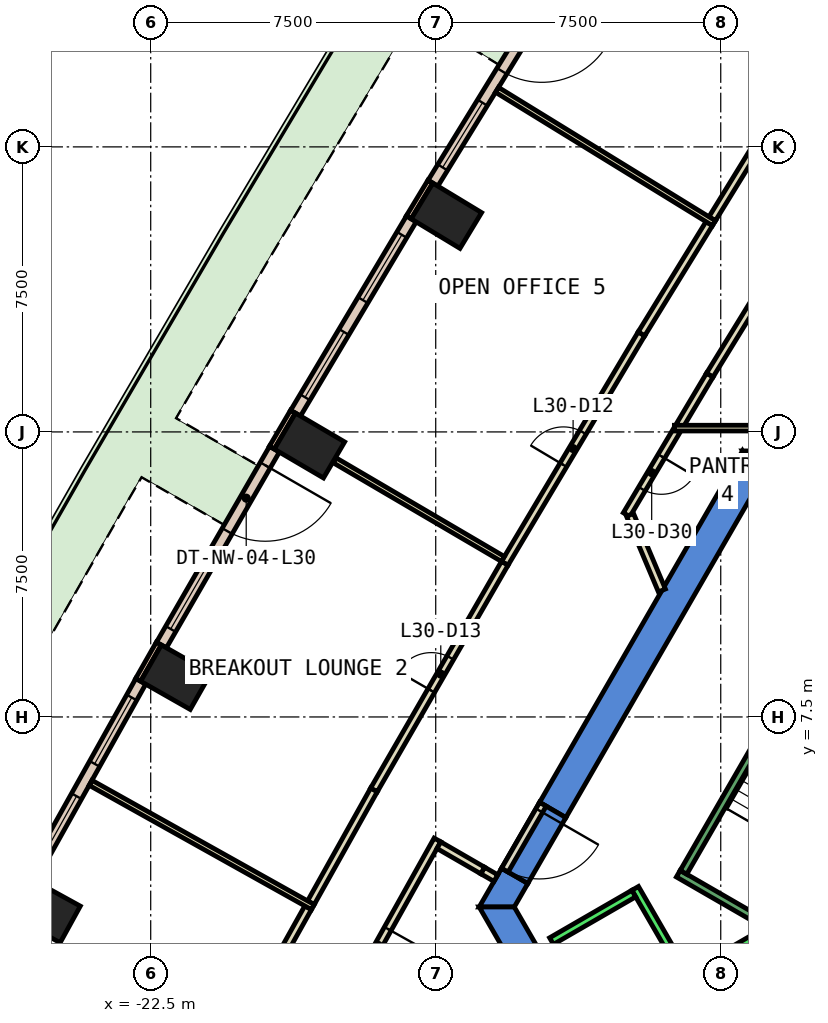
"""IFC4 building model, lengths in metres.
Left out: names, types, materials, properties, quantities, classifications, styles, units other than length and angle.
Written with IfcOpenShell. Run it as: python <this file> out.ifc"""

import sys

from ifc_helpers import new_model, si_unit, direction, frame, frame_2d, origin, origin_2d, place, context, subcontext, project, spatial, polyline, rectangle, outline, extrude, element, fill, save


model = new_model("IFC4")
c1 = context("Model", 3, precision=1e-05, world=origin(), true_north=direction((0.0, 1.0)))
c2 = subcontext(c1, "Body", "Model", "MODEL_VIEW")
j1 = project(units=[si_unit("LENGTHUNIT", "METRE"), si_unit("PLANEANGLEUNIT", "RADIAN")], contexts=[c1])
p1 = place(None, origin())
s1 = spatial("IfcSite", under=j1, at=p1, CompositionType="ELEMENT")
p2 = place(p1, origin())
s2 = spatial("IfcBuilding", under=s1, at=p2, CompositionType="ELEMENT")
p3 = place(p2, frame((0.0, 0.0, 138.2)))
s3 = spatial("IfcBuildingStorey", under=s2, at=p3, CompositionType="ELEMENT", Elevation=138.2)
for number, where, z_axis, x_axis in (
    (1, (-14.719, 20.688, 0.0), (0.0, 0.0, 1.0), (0.518, 0.855, 0.0)),
    (2, (-18.322, 14.642, 0.0), (0.0, 0.0, 1.0), (0.506, 0.863, 0.0)),
    (3, (-21.84, 8.546, 0.0), (0.0, 0.0, 1.0), (0.494, 0.869, 0.0)),
    (4, (-25.275, 2.403, 0.0), (0.0, 0.0, 1.0), (0.482, 0.876, 0.0)),
):
    element("IfcColumn", number, at=place(p3, frame(where, z_axis=z_axis, x_axis=x_axis)), inside=s3, PredefinedType="COLUMN", context=c2, shape_type="SweptSolid", body=[
        extrude(rectangle(XDim=1.1, YDim=1.5, at=origin_2d()), origin(), (0.0, 0.0, 1.0), 3.8),
    ])
p4 = place(p3, frame((0.0, 0.0, -0.6)))
e5 = element("IfcWall", 5, at=p4, inside=s3, PredefinedType="SHEAR", context=c2, shape_type="SweptSolid", body=[
    extrude(outline(polyline([(6.928, 14.5), (-6.928, 14.5), (-6.466, 13.7), (6.466, 13.7), (6.928, 14.5)])), origin(), (0.0, 0.0, 1.0), 4.4),
])
p5 = place(p3, frame((0.0, 0.0, -0.6)))
e6 = element("IfcWall", 6, at=p5, inside=s3, PredefinedType="SHEAR", context=c2, shape_type="SweptSolid", body=[
    extrude(outline(polyline([(-12.267, 5.252), (-11.575, 4.852), (-6.466, 13.7), (-6.928, 14.5), (-12.267, 5.252)])), origin(), (0.0, 0.0, 1.0), 4.4),
])
p6 = place(p3, frame((0.0, 0.0, -0.6)))
e7 = element("IfcWall", 7, at=p6, inside=s3, PredefinedType="SHEAR", context=c2, shape_type="SweptSolid", body=[
    extrude(outline(polyline([(-12.575, 3.12), (-13.267, 3.52), (-13.856, 2.5), (-12.933, 2.5), (-12.575, 3.12)])), origin(), (0.0, 0.0, 1.0), 4.4),
])
p7 = place(p3, frame((0.0, 0.0, 3.6)))
e8 = element("IfcWall", 8, at=p7, inside=s3, PredefinedType="SHEAR", context=c2, shape_type="SweptSolid", body=[
    extrude(outline(polyline([(-13.267, 3.52), (-12.575, 3.12), (-11.575, 4.852), (-12.267, 5.252), (-13.267, 3.52)])), origin(), (0.0, 0.0, 1.0), 0.2),
])
p8 = place(p3, frame((0.0, 0.0, -0.6)))
e9 = element("IfcWall", 9, at=p8, inside=s3, PredefinedType="SHEAR", context=c2, shape_type="SweptSolid", body=[
    extrude(outline(polyline([(-13.856, 2.5), (-6.928, -9.5), (-6.466, -8.7), (-12.933, 2.5), (-13.856, 2.5)])), origin(), (0.0, 0.0, 1.0), 4.4),
])
p9 = place(p3, frame((-15.14, 21.586, 0.0), z_axis=(0.0, 0.0, 1.0), x_axis=(-0.518178754102, -0.855272341888, 0.0)))
e10 = element("IfcWall", 10, at=p9, inside=s3, PredefinedType="STANDARD", context=c2, shape_type="SweptSolid", body=[
    extrude(rectangle(XDim=1.1, YDim=0.15, at=frame_2d((0.55, 0.0))), origin(), (0.0, 0.0, 1.0), 3.8),
])
p10 = place(p3, frame((-18.755, 15.533, 0.0), z_axis=(0.0, 0.0, 1.0), x_axis=(-0.50667077411, -0.862139621327, 0.0)))
e11 = element("IfcWall", 11, at=p10, inside=s3, PredefinedType="STANDARD", context=c2, shape_type="SweptSolid", body=[
    extrude(rectangle(XDim=1.1, YDim=0.15, at=frame_2d((0.55, 0.0))), origin(), (0.0, 0.0, 1.0), 3.8),
])
p11 = place(p3, frame((-22.286, 9.432, 0.0), z_axis=(0.0, 0.0, 1.0), x_axis=(-0.494775760346, -0.869020682708, 0.0)))
e12 = element("IfcWall", 12, at=p11, inside=s3, PredefinedType="STANDARD", context=c2, shape_type="SweptSolid", body=[
    extrude(rectangle(XDim=1.1, YDim=0.15, at=frame_2d((0.55, 0.0))), origin(), (0.0, 0.0, 1.0), 3.8),
])
p12 = place(p3, frame((-11.956, 26.614, 0.0), z_axis=(0.0, 0.0, 1.0), x_axis=(-0.523719731127, -0.851890628677, 0.0)))
e13 = element("IfcWall", 13, at=p12, inside=s3, PredefinedType="STANDARD", context=c2, shape_type="SweptSolid", body=[
    extrude(rectangle(XDim=5.952, YDim=0.3, at=frame_2d((2.976, 0.0))), origin(), (0.0, 0.0, 1.0), 3.8),
])
p13 = place(p12, frame((0.488, 0.0, 0.0)))
e14 = element("IfcOpeningElement", 14, at=p13, cuts=e13, PredefinedType="OPENING", context=c2, shape_type="SweptSolid", body=[
    extrude(rectangle(XDim=2.0, YDim=2.4, at=frame_2d((1.0, 1.2))), frame((0.0, 0.16, 0.0), z_axis=(0.0, -1.0, 0.0), x_axis=(1.0, 0.0, 0.0)), (0.0, 0.0, 1.0), 0.32),
])
p14 = place(p12, frame((3.464, 0.0, 0.9)))
e15 = element("IfcOpeningElement", 15, at=p14, cuts=e13, PredefinedType="OPENING", context=c2, shape_type="SweptSolid", body=[
    extrude(rectangle(XDim=2.0, YDim=2.6, at=frame_2d((1.0, 1.3))), frame((0.0, 0.16, 0.0), z_axis=(0.0, -1.0, 0.0), x_axis=(1.0, 0.0, 0.0)), (0.0, 0.0, 1.0), 0.32),
])
p15 = place(p3, frame((-15.642, 20.605, 0.0), z_axis=(0.0, 0.0, 1.0), x_axis=(-0.511856715331, -0.859070836992, 0.0)))
e16 = element("IfcWall", 16, at=p15, inside=s3, PredefinedType="STANDARD", context=c2, shape_type="SweptSolid", body=[
    extrude(rectangle(XDim=5.951, YDim=0.3, at=frame_2d((2.975, 0.0))), origin(), (0.0, 0.0, 1.0), 3.8),
])
p16 = place(p15, frame((0.488, 0.0, 0.9)))
e17 = element("IfcOpeningElement", 17, at=p16, cuts=e16, PredefinedType="OPENING", context=c2, shape_type="SweptSolid", body=[
    extrude(rectangle(XDim=2.0, YDim=2.6, at=frame_2d((1.0, 1.3))), frame((0.0, 0.16, 0.0), z_axis=(0.0, -1.0, 0.0), x_axis=(1.0, 0.0, 0.0)), (0.0, 0.0, 1.0), 0.32),
])
p17 = place(p15, frame((3.463, 0.0, 0.9)))
e18 = element("IfcOpeningElement", 18, at=p17, cuts=e16, PredefinedType="OPENING", context=c2, shape_type="SweptSolid", body=[
    extrude(rectangle(XDim=2.0, YDim=2.6, at=frame_2d((1.0, 1.3))), frame((0.0, 0.16, 0.0), z_axis=(0.0, -1.0, 0.0), x_axis=(1.0, 0.0, 0.0)), (0.0, 0.0, 1.0), 0.32),
])
p18 = place(p3, frame((-19.243, 14.546, 0.0), z_axis=(0.0, 0.0, 1.0), x_axis=(-0.49994263896, -0.866058518664, 0.0)))
e19 = element("IfcWall", 19, at=p18, inside=s3, PredefinedType="STANDARD", context=c2, shape_type="SweptSolid", body=[
    extrude(rectangle(XDim=5.951, YDim=0.3, at=frame_2d((2.976, 0.0))), origin(), (0.0, 0.0, 1.0), 3.8),
])
p19 = place(p18, frame((0.488, 0.0, 0.0)))
e20 = element("IfcOpeningElement", 20, at=p19, cuts=e19, PredefinedType="OPENING", context=c2, shape_type="SweptSolid", body=[
    extrude(rectangle(XDim=2.0, YDim=2.4, at=frame_2d((1.0, 1.2))), frame((0.0, 0.16, 0.0), z_axis=(0.0, -1.0, 0.0), x_axis=(1.0, 0.0, 0.0)), (0.0, 0.0, 1.0), 0.32),
])
p20 = place(p18, frame((3.463, 0.0, 0.9)))
e21 = element("IfcOpeningElement", 21, at=p20, cuts=e19, PredefinedType="OPENING", context=c2, shape_type="SweptSolid", body=[
    extrude(rectangle(XDim=2.0, YDim=2.6, at=frame_2d((1.0, 1.3))), frame((0.0, 0.16, 0.0), z_axis=(0.0, -1.0, 0.0), x_axis=(1.0, 0.0, 0.0)), (0.0, 0.0, 1.0), 0.32),
])
p21 = place(p3, frame((-22.761, 8.438, 0.0), z_axis=(0.0, 0.0, 1.0), x_axis=(-0.488009846284, -0.872838123555, 0.0)))
e22 = element("IfcWall", 22, at=p21, inside=s3, PredefinedType="STANDARD", context=c2, shape_type="SweptSolid", body=[
    extrude(rectangle(XDim=5.951, YDim=0.3, at=frame_2d((2.976, 0.0))), origin(), (0.0, 0.0, 1.0), 3.8),
])
p22 = place(p21, frame((0.488, 0.0, 0.9)))
e23 = element("IfcOpeningElement", 23, at=p22, cuts=e22, PredefinedType="OPENING", context=c2, shape_type="SweptSolid", body=[
    extrude(rectangle(XDim=2.0, YDim=2.6, at=frame_2d((1.0, 1.3))), frame((0.0, 0.16, 0.0), z_axis=(0.0, -1.0, 0.0), x_axis=(1.0, 0.0, 0.0)), (0.0, 0.0, 1.0), 0.32),
])
p23 = place(p21, frame((3.463, 0.0, 0.9)))
e24 = element("IfcOpeningElement", 24, at=p23, cuts=e22, PredefinedType="OPENING", context=c2, shape_type="SweptSolid", body=[
    extrude(rectangle(XDim=2.0, YDim=2.6, at=frame_2d((1.0, 1.3))), frame((0.0, 0.16, 0.0), z_axis=(0.0, -1.0, 0.0), x_axis=(1.0, 0.0, 0.0)), (0.0, 0.0, 1.0), 0.32),
])
p24 = place(p3, frame((-8.658, 15.036, 0.0), z_axis=(0.0, 0.0, 1.0), x_axis=(-0.511860217954, -0.859068750029, 0.0)))
e25 = element("IfcWall", 25, at=p24, inside=s3, PredefinedType="PARTITIONING", context=c2, shape_type="SweptSolid", body=[
    extrude(rectangle(XDim=2.577, YDim=0.2, at=frame_2d((1.289, 0.0))), origin(), (0.0, 0.0, 1.0), 3.8),
])
p25 = place(p24, frame((0.788, 0.0, 0.0)))
e26 = element("IfcOpeningElement", 26, at=p25, cuts=e25, PredefinedType="OPENING", context=c2, shape_type="SweptSolid", body=[
    extrude(rectangle(XDim=1.0, YDim=2.1, at=frame_2d((0.5, 1.05))), frame((0.0, 0.11, 0.0), z_axis=(0.0, -1.0, 0.0), x_axis=(1.0, 0.0, 0.0)), (0.0, 0.0, 1.0), 0.22),
])
p26 = place(p3, frame((-9.887, 12.816, 0.0), z_axis=(0.0, 0.0, 1.0), x_axis=(0.388765037942, -0.921336933632, 0.0)))
e27 = element("IfcWall", 27, at=p26, inside=s3, PredefinedType="PARTITIONING", context=c2, shape_type="SweptSolid", body=[
    extrude(rectangle(XDim=2.158, YDim=0.2, at=frame_2d((1.079, 0.0))), origin(), (0.0, 0.0, 1.0), 3.8),
])
p27 = place(p3, frame((-4.162, 22.395, 0.0), z_axis=(0.0, 0.0, 1.0), x_axis=(-0.523625371849, -0.851948631055, 0.0)))
e28 = element("IfcWall", 28, at=p27, inside=s3, PredefinedType="PARTITIONING", context=c2, shape_type="SweptSolid", body=[
    extrude(rectangle(XDim=6.927, YDim=0.2, at=frame_2d((3.463, 0.0))), origin(), (0.0, 0.0, 1.0), 3.8),
])
p28 = place(p3, frame((-7.789, 16.494, 0.0), z_axis=(0.0, 0.0, 1.0), x_axis=(-0.511686277462, -0.859172365394, 0.0)))
e29 = element("IfcWall", 29, at=p28, inside=s3, PredefinedType="PARTITIONING", context=c2, shape_type="SweptSolid", body=[
    extrude(rectangle(XDim=1.548, YDim=0.2, at=frame_2d((0.774, 0.0))), origin(), (0.0, 0.0, 1.0), 3.8),
])
p29 = place(p3, frame((-13.417, 3.26, 0.0), z_axis=(0.0, 0.0, 1.0), x_axis=(-0.866398669086, 0.499352927503, 0.0)))
e30 = element("IfcWall", 30, at=p29, inside=s3, PredefinedType="PARTITIONING", context=c2, shape_type="SweptSolid", body=[
    extrude(rectangle(XDim=0.4, YDim=0.2, at=frame_2d((0.2, 0.0))), origin(), (0.0, 0.0, 1.0), 2.4),
])
p30 = place(p3, frame((-14.955, 4.264, 0.0), z_axis=(0.0, 0.0, 1.0), x_axis=(-0.4879770011, -0.872856486713, 0.0)))
e31 = element("IfcWall", 31, at=p30, inside=s3, PredefinedType="PARTITIONING", context=c2, shape_type="SweptSolid", body=[
    extrude(rectangle(XDim=6.363, YDim=0.2, at=frame_2d((3.182, 0.0))), origin(), (0.0, 0.0, 1.0), 3.8),
])
p31 = place(p30, frame((2.681, 0.0, 0.0)))
e32 = element("IfcOpeningElement", 32, at=p31, cuts=e31, PredefinedType="OPENING", context=c2, shape_type="SweptSolid", body=[
    extrude(rectangle(XDim=1.0, YDim=2.1, at=frame_2d((0.5, 1.05))), frame((0.0, 0.11, 0.0), z_axis=(0.0, -1.0, 0.0), x_axis=(1.0, 0.0, 0.0)), (0.0, 0.0, 1.0), 0.22),
])
p32 = place(p3, frame((-7.725, 20.608, 0.0), z_axis=(0.0, 0.0, 1.0), x_axis=(0.523645038298, 0.851936543333, 0.0)))
e33 = element("IfcWall", 33, at=p32, inside=s3, PredefinedType="PARTITIONING", context=c2, shape_type="SweptSolid", body=[
    extrude(rectangle(XDim=3.403, YDim=0.2, at=frame_2d((1.702, 0.0))), origin(), (0.0, 0.0, 1.0), 3.8),
])
p33 = place(p3, frame((-13.184, 11.542, 0.0), z_axis=(0.0, 0.0, 1.0), x_axis=(0.511847713534, 0.859076200433, 0.0)))
e34 = element("IfcWall", 34, at=p33, inside=s3, PredefinedType="PARTITIONING", context=c2, shape_type="SweptSolid", body=[
    extrude(rectangle(XDim=7.03, YDim=0.2, at=frame_2d((3.515, 0.0))), origin(), (0.0, 0.0, 1.0), 3.8),
])
p34 = place(p33, frame((3.015, 0.0, 0.0)))
e35 = element("IfcOpeningElement", 35, at=p34, cuts=e34, PredefinedType="OPENING", context=c2, shape_type="SweptSolid", body=[
    extrude(rectangle(XDim=1.0, YDim=2.1, at=frame_2d((0.5, 1.05))), frame((0.0, 0.11, 0.0), z_axis=(0.0, -1.0, 0.0), x_axis=(1.0, 0.0, 0.0)), (0.0, 0.0, 1.0), 0.22),
])
p35 = place(p3, frame((-9.586, 17.581, 0.0), z_axis=(0.0, 0.0, 1.0), x_axis=(0.523757261565, 0.851867554822, 0.0)))
e36 = element("IfcWall", 36, at=p35, inside=s3, PredefinedType="PARTITIONING", context=c2, shape_type="SweptSolid", body=[
    extrude(rectangle(XDim=3.404, YDim=0.2, at=frame_2d((1.702, 0.0))), origin(), (0.0, 0.0, 1.0), 3.8),
])
p36 = place(p3, frame((-18.284, 2.612, 0.0), z_axis=(0.0, 0.0, 1.0), x_axis=(0.487871212611, 0.872915620152, 0.0)))
e37 = element("IfcWall", 37, at=p36, inside=s3, PredefinedType="PARTITIONING", context=c2, shape_type="SweptSolid", body=[
    extrude(rectangle(XDim=3.402, YDim=0.2, at=frame_2d((1.701, 0.0))), origin(), (0.0, 0.0, 1.0), 3.8),
])
p37 = place(p3, frame((-16.624, 5.582, 0.0), z_axis=(0.0, 0.0, 1.0), x_axis=(0.499886250151, 0.866091067331, 0.0)))
e38 = element("IfcWall", 38, at=p37, inside=s3, PredefinedType="PARTITIONING", context=c2, shape_type="SweptSolid", body=[
    extrude(rectangle(XDim=6.881, YDim=0.2, at=frame_2d((3.441, 0.0))), origin(), (0.0, 0.0, 1.0), 3.8),
])
p38 = place(p37, frame((3.015, 0.0, 0.0)))
e39 = element("IfcOpeningElement", 39, at=p38, cuts=e38, PredefinedType="OPENING", context=c2, shape_type="SweptSolid", body=[
    extrude(rectangle(XDim=1.0, YDim=2.1, at=frame_2d((0.5, 1.05))), frame((0.0, 0.11, 0.0), z_axis=(0.0, -1.0, 0.0), x_axis=(1.0, 0.0, 0.0)), (0.0, 0.0, 1.0), 0.22),
])
p39 = place(p3, frame((-20.018, -0.489, 0.0), z_axis=(0.0, 0.0, 1.0), x_axis=(0.48792588674, 0.872885060617, 0.0)))
e40 = element("IfcWall", 40, at=p39, inside=s3, PredefinedType="PARTITIONING", context=c2, shape_type="SweptSolid", body=[
    extrude(rectangle(XDim=3.403, YDim=0.2, at=frame_2d((1.701, 0.0))), origin(), (0.0, 0.0, 1.0), 3.8),
])
p40 = place(p3, frame((-4.272, 15.1, 0.0), z_axis=(0.0, 0.0, 1.0), x_axis=(-1.0, 0.0, 0.0)))
e41 = element("IfcWall", 41, at=p40, inside=s3, PredefinedType="PARTITIONING", context=c2, shape_type="SweptSolid", body=[
    extrude(rectangle(XDim=4.448, YDim=0.15, at=frame_2d((2.224, 0.0))), origin(), (0.0, 0.0, 1.0), 3.8),
])
p41 = place(p3, frame((-7.679, 20.492, 0.0), z_axis=(0.0, 0.0, 1.0), x_axis=(-0.851897179877, 0.523709074695, 0.0)))
e42 = element("IfcWall", 42, at=p41, inside=s3, PredefinedType="PARTITIONING", context=c2, shape_type="SweptSolid", body=[
    extrude(rectangle(XDim=6.7, YDim=0.15, at=frame_2d((3.35, 0.0))), origin(), (0.0, 0.0, 1.0), 3.8),
])
p42 = place(p3, frame((-13.232, 11.657, 0.0), z_axis=(0.0, 0.0, 1.0), x_axis=(-0.862663606034, 0.505778116197, 0.0)))
e43 = element("IfcWall", 43, at=p42, inside=s3, PredefinedType="PARTITIONING", context=c2, shape_type="SweptSolid", body=[
    extrude(rectangle(XDim=5.131, YDim=0.15, at=frame_2d((2.565, 0.0))), origin(), (0.0, 0.0, 1.0), 3.8),
])
p43 = place(p3, frame((-18.234, 2.497, 0.0), z_axis=(0.0, 0.0, 1.0), x_axis=(-0.872820235044, 0.4880418397, 0.0)))
e44 = element("IfcWall", 44, at=p43, inside=s3, PredefinedType="PARTITIONING", context=c2, shape_type="SweptSolid", body=[
    extrude(rectangle(XDim=6.7, YDim=0.15, at=frame_2d((3.35, 0.0))), origin(), (0.0, 0.0, 1.0), 3.8),
])
p44 = place(p3, frame((-12.18, 5.202, 0.0), z_axis=(0.0, 0.0, 1.0), x_axis=(-0.50002537861, -0.866010750942, 0.0)))
e45 = element("IfcWall", 45, at=p44, inside=s3, PredefinedType="PARTITIONING", context=c2, shape_type="SweptSolid", body=[
    extrude(rectangle(XDim=2.0, YDim=0.2, at=frame_2d((1.0, 0.0))), origin(), (0.0, 0.0, 1.0), 2.4),
])
p45 = place(p44, frame((0.19, 0.0, 0.0)))
e46 = element("IfcOpeningElement", 46, at=p45, cuts=e45, PredefinedType="OPENING", context=c2, shape_type="SweptSolid", body=[
    extrude(rectangle(XDim=1.8, YDim=2.1, at=frame_2d((0.9, 1.05))), frame((0.0, 0.11, 0.0), z_axis=(0.0, -1.0, 0.0), x_axis=(1.0, 0.0, 0.0)), (0.0, 0.0, 1.0), 0.22),
])
p46 = place(p3, frame((-13.764, 3.46, 0.0), z_axis=(0.0, 0.0, 1.0), x_axis=(-0.865932130826, 0.500161518715, 0.0)))
e47 = element("IfcWall", 47, at=p46, inside=s3, PredefinedType="PARTITIONING", context=c2, shape_type="SweptSolid", body=[
    extrude(rectangle(XDim=1.332, YDim=0.2, at=frame_2d((0.666, 0.0))), origin(), (0.0, 0.0, 1.0), 3.8),
])
p47 = place(p3, frame((-5.977, 2.052, 0.0), z_axis=(0.0, 0.0, 1.0), x_axis=(-0.865973769406, -0.500089422704, 0.0)))
e48 = element("IfcWall", 48, at=p47, inside=s3, PredefinedType="STANDARD", context=c2, shape_type="SweptSolid", body=[
    extrude(rectangle(XDim=2.399, YDim=0.2, at=frame_2d((1.2, 0.0))), origin(), (0.0, 0.0, 1.0), 3.8),
])
p48 = place(p3, frame((-9.751, 2.99, 0.0), z_axis=(0.0, 0.0, 1.0), x_axis=(0.50000090737, -0.866024879913, 0.0)))
e49 = element("IfcWall", 49, at=p48, inside=s3, PredefinedType="STANDARD", context=c2, shape_type="SweptSolid", body=[
    extrude(rectangle(XDim=10.6, YDim=0.2, at=frame_2d((5.3, 0.0))), origin(), (0.0, 0.0, 1.0), 3.8),
])
p49 = place(p3, frame((-9.788, 2.853, 0.0), z_axis=(0.0, 0.0, 1.0), x_axis=(-0.865998541277, -0.500046524342, 0.0)))
e50 = element("IfcWall", 50, at=p49, inside=s3, PredefinedType="STANDARD", context=c2, shape_type="SweptSolid", body=[
    extrude(rectangle(XDim=2.5, YDim=0.2, at=frame_2d((1.25, 0.0))), origin(), (0.0, 0.0, 1.0), 3.8),
])
p50 = place(p3, frame((-6.25, 2.01, 0.0), z_axis=(0.0, 0.0, 1.0), x_axis=(-0.86611865017, 0.499838457731, 0.0)))
e51 = element("IfcWall", 51, at=p50, inside=s3, PredefinedType="STANDARD", context=c2, shape_type="SweptSolid", body=[
    extrude(rectangle(XDim=2.733, YDim=0.2, at=frame_2d((1.366, 0.0))), origin(), (0.0, 0.0, 1.0), 3.8),
])
p51 = place(p3, frame((-5.03, 9.388, 0.0), z_axis=(0.0, 0.0, 1.0), x_axis=(-0.499978703459, -0.866037698999, 0.0)))
e52 = element("IfcWall", 52, at=p51, inside=s3, PredefinedType="STANDARD", context=c2, shape_type="SweptSolid", body=[
    extrude(rectangle(XDim=6.9, YDim=0.2, at=frame_2d((3.45, 0.0))), origin(), (0.0, 0.0, 1.0), 3.8),
])
p52 = place(p13, origin())
e53 = element("IfcDoor", 53, at=p52, inside=s3, OperationType="SLIDING_TO_LEFT", PredefinedType="DOOR", context=c2, shape_type="SweptSolid", body=[
    extrude(rectangle(XDim=2.0, YDim=2.4, at=frame_2d((1.0, 1.2))), frame((0.0, 0.025, 0.0), z_axis=(0.0, -1.0, 0.0), x_axis=(1.0, 0.0, 0.0)), (0.0, 0.0, 1.0), 0.05),
])
fill(e14, e53)
p53 = place(p14, origin())
e54 = element("IfcWindow", 54, at=p53, inside=s3, PartitioningType="SINGLE_PANEL", PredefinedType="WINDOW", context=c2, shape_type="SweptSolid", body=[
    extrude(rectangle(XDim=2.0, YDim=2.6, at=frame_2d((1.0, 1.3))), frame((0.0, 0.03, 0.0), z_axis=(0.0, -1.0, 0.0), x_axis=(1.0, 0.0, 0.0)), (0.0, 0.0, 1.0), 0.06),
])
fill(e15, e54)
p54 = place(p16, origin())
e55 = element("IfcWindow", 55, at=p54, inside=s3, PartitioningType="SINGLE_PANEL", PredefinedType="WINDOW", context=c2, shape_type="SweptSolid", body=[
    extrude(rectangle(XDim=2.0, YDim=2.6, at=frame_2d((1.0, 1.3))), frame((0.0, 0.03, 0.0), z_axis=(0.0, -1.0, 0.0), x_axis=(1.0, 0.0, 0.0)), (0.0, 0.0, 1.0), 0.06),
])
fill(e17, e55)
p55 = place(p17, origin())
e56 = element("IfcWindow", 56, at=p55, inside=s3, PartitioningType="SINGLE_PANEL", PredefinedType="WINDOW", context=c2, shape_type="SweptSolid", body=[
    extrude(rectangle(XDim=2.0, YDim=2.6, at=frame_2d((1.0, 1.3))), frame((0.0, 0.03, 0.0), z_axis=(0.0, -1.0, 0.0), x_axis=(1.0, 0.0, 0.0)), (0.0, 0.0, 1.0), 0.06),
])
fill(e18, e56)
p56 = place(p19, origin())
e57 = element("IfcDoor", 57, at=p56, inside=s3, OperationType="SLIDING_TO_LEFT", PredefinedType="DOOR", context=c2, shape_type="SweptSolid", body=[
    extrude(rectangle(XDim=2.0, YDim=2.4, at=frame_2d((1.0, 1.2))), frame((0.0, 0.025, 0.0), z_axis=(0.0, -1.0, 0.0), x_axis=(1.0, 0.0, 0.0)), (0.0, 0.0, 1.0), 0.05),
])
fill(e20, e57)
p57 = place(p20, origin())
e58 = element("IfcWindow", 58, at=p57, inside=s3, PartitioningType="SINGLE_PANEL", PredefinedType="WINDOW", context=c2, shape_type="SweptSolid", body=[
    extrude(rectangle(XDim=2.0, YDim=2.6, at=frame_2d((1.0, 1.3))), frame((0.0, 0.03, 0.0), z_axis=(0.0, -1.0, 0.0), x_axis=(1.0, 0.0, 0.0)), (0.0, 0.0, 1.0), 0.06),
])
fill(e21, e58)
p58 = place(p22, origin())
e59 = element("IfcWindow", 59, at=p58, inside=s3, PartitioningType="SINGLE_PANEL", PredefinedType="WINDOW", context=c2, shape_type="SweptSolid", body=[
    extrude(rectangle(XDim=2.0, YDim=2.6, at=frame_2d((1.0, 1.3))), frame((0.0, 0.03, 0.0), z_axis=(0.0, -1.0, 0.0), x_axis=(1.0, 0.0, 0.0)), (0.0, 0.0, 1.0), 0.06),
])
fill(e23, e59)
p59 = place(p23, origin())
e60 = element("IfcWindow", 60, at=p59, inside=s3, PartitioningType="SINGLE_PANEL", PredefinedType="WINDOW", context=c2, shape_type="SweptSolid", body=[
    extrude(rectangle(XDim=2.0, YDim=2.6, at=frame_2d((1.0, 1.3))), frame((0.0, 0.03, 0.0), z_axis=(0.0, -1.0, 0.0), x_axis=(1.0, 0.0, 0.0)), (0.0, 0.0, 1.0), 0.06),
])
fill(e24, e60)
p60 = place(p34, origin())
e61 = element("IfcDoor", 61, at=p60, inside=s3, OperationType="SINGLE_SWING_RIGHT", PredefinedType="DOOR", context=c2, shape_type="SweptSolid", body=[
    extrude(rectangle(XDim=1.0, YDim=2.1, at=frame_2d((0.5, 1.05))), frame((0.0, 0.025, 0.0), z_axis=(0.0, -1.0, 0.0), x_axis=(1.0, 0.0, 0.0)), (0.0, 0.0, 1.0), 0.05),
])
fill(e35, e61)
p61 = place(p38, origin())
e62 = element("IfcDoor", 62, at=p61, inside=s3, OperationType="SINGLE_SWING_LEFT", PredefinedType="DOOR", context=c2, shape_type="SweptSolid", body=[
    extrude(rectangle(XDim=1.0, YDim=2.1, at=frame_2d((0.5, 1.05))), frame((0.0, 0.025, 0.0), z_axis=(0.0, -1.0, 0.0), x_axis=(1.0, 0.0, 0.0)), (0.0, 0.0, 1.0), 0.05),
])
fill(e39, e62)
p62 = place(p31, origin())
e63 = element("IfcDoor", 63, at=p62, inside=s3, OperationType="SINGLE_SWING_LEFT", PredefinedType="DOOR", context=c2, shape_type="SweptSolid", body=[
    extrude(rectangle(XDim=1.0, YDim=2.1, at=frame_2d((0.5, 1.05))), frame((0.0, 0.025, 0.0), z_axis=(0.0, -1.0, 0.0), x_axis=(1.0, 0.0, 0.0)), (0.0, 0.0, 1.0), 0.05),
])
fill(e32, e63)
p63 = place(p25, origin())
e64 = element("IfcDoor", 64, at=p63, inside=s3, OperationType="SINGLE_SWING_LEFT", PredefinedType="DOOR", context=c2, shape_type="SweptSolid", body=[
    extrude(rectangle(XDim=1.0, YDim=2.1, at=frame_2d((0.5, 1.05))), frame((0.0, 0.025, 0.0), z_axis=(0.0, -1.0, 0.0), x_axis=(1.0, 0.0, 0.0)), (0.0, 0.0, 1.0), 0.05),
])
fill(e26, e64)
p64 = place(p45, origin())
e65 = element("IfcDoor", 65, at=p64, inside=s3, OperationType="DOUBLE_DOOR_SINGLE_SWING", PredefinedType="DOOR", context=c2, shape_type="SweptSolid", body=[
    extrude(rectangle(XDim=1.8, YDim=2.1, at=frame_2d((0.9, 1.05))), frame((0.0, 0.025, 0.0), z_axis=(0.0, -1.0, 0.0), x_axis=(1.0, 0.0, 0.0)), (0.0, 0.0, 1.0), 0.05),
])
fill(e46, e65)
save(model, sys.argv[1])
